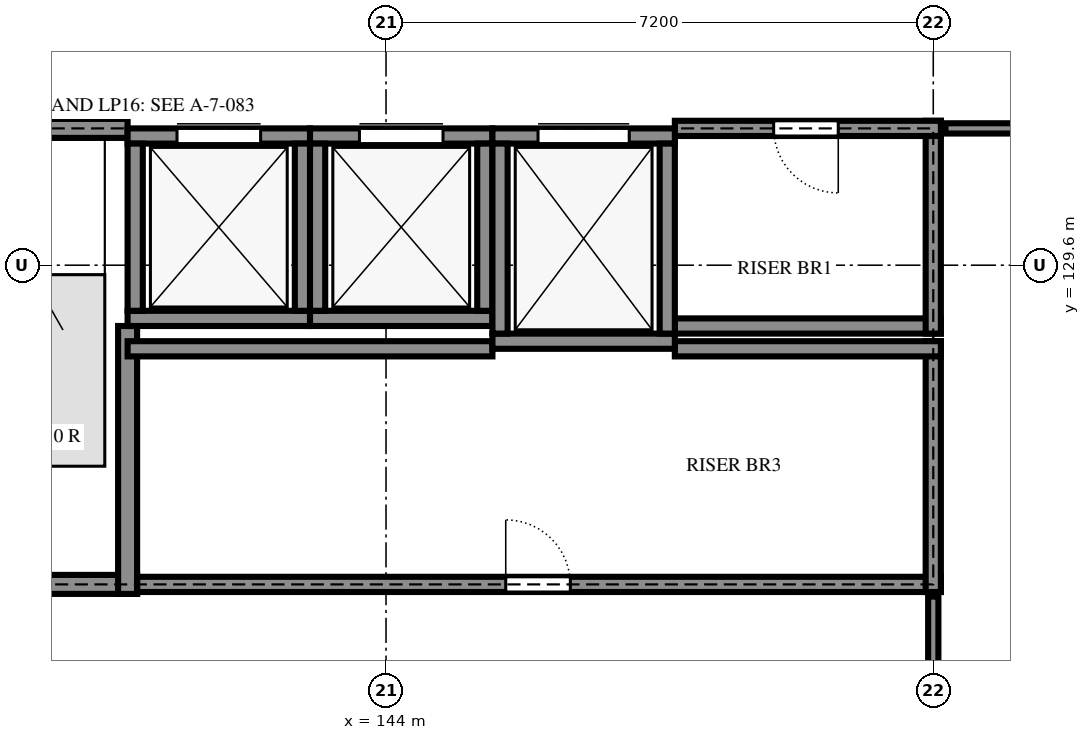
"""IFC4 building model, lengths in metres.
Left out: names, types, materials, properties, quantities, classifications, styles, units other than length and angle.
Written with IfcOpenShell. Run it as: python <this file> out.ifc"""

import sys

from ifc_helpers import new_model, si_unit, direction, frame, frame_2d, origin, place, context, subcontext, project, spatial, rectangle, extrude, element, fill, save


model = new_model("IFC4")
c1 = context("Model", 3, precision=1e-05, world=origin(), true_north=direction((0.0, 1.0)))
c2 = subcontext(c1, "Body", "Model", "MODEL_VIEW")
j1 = project(units=[si_unit("LENGTHUNIT", "METRE"), si_unit("PLANEANGLEUNIT", "RADIAN")], contexts=[c1])
p1 = place(None, origin())
s1 = spatial("IfcSite", under=j1, at=p1, CompositionType="ELEMENT")
p2 = place(p1, origin())
s2 = spatial("IfcBuilding", under=s1, at=p2, CompositionType="ELEMENT")
p3 = place(p2, origin())
s3 = spatial("IfcBuildingStorey", under=s2, at=p3, CompositionType="ELEMENT", Elevation=0.0)
p4 = place(p3, frame((136.675, 125.4, 0.0), z_axis=(0.0, 0.0, 1.0), x_axis=(1.0, 0.0, 0.0)))
e1 = element("IfcWall", 1, at=p4, inside=s3, PredefinedType="SHEAR", context=c2, shape_type="SweptSolid", body=[
    extrude(rectangle(XDim=4.05, YDim=0.25, at=frame_2d((2.025, 0.0))), origin(), (0.0, 0.0, 1.0), 3.6),
])
p5 = place(p4, frame((1.375, 0.0, 0.0)))
e2 = element("IfcOpeningElement", 2, at=p5, cuts=e1, PredefinedType="OPENING", context=c2, shape_type="SweptSolid", body=[
    extrude(rectangle(XDim=1.2, YDim=2.4, at=frame_2d((0.6, 1.2))), frame((0.0, 0.135, 0.0), z_axis=(0.0, -1.0, 0.0), x_axis=(1.0, 0.0, 0.0)), (0.0, 0.0, 1.0), 0.27),
])
p6 = place(p3, frame((140.725, 125.4, 0.0), z_axis=(0.0, 0.0, 1.0), x_axis=(1.0, 0.0, 0.0)))
e3 = element("IfcWall", 3, at=p6, inside=s3, PredefinedType="SHEAR", context=c2, shape_type="SweptSolid", body=[
    extrude(rectangle(XDim=10.575, YDim=0.2, at=frame_2d((5.288, 0.0))), origin(), (0.0, 0.0, 1.0), 3.6),
])
p7 = place(p6, frame((4.85, 0.0, 0.0)))
e4 = element("IfcOpeningElement", 4, at=p7, cuts=e3, PredefinedType="OPENING", context=c2, shape_type="SweptSolid", body=[
    extrude(rectangle(XDim=0.85, YDim=2.1, at=frame_2d((0.425, 1.05))), frame((0.0, 0.11, 0.0), z_axis=(0.0, -1.0, 0.0), x_axis=(1.0, 0.0, 0.0)), (0.0, 0.0, 1.0), 0.22),
])
p8 = place(p3, frame((140.6, 125.275, 0.0), z_axis=(0.0, 0.0, 1.0), x_axis=(0.0, 1.0, 0.0)))
e5 = element("IfcWall", 5, at=p8, inside=s3, PredefinedType="SHEAR", context=c2, shape_type="SweptSolid", body=[
    extrude(rectangle(XDim=3.525, YDim=0.25, at=frame_2d((1.763, 0.0))), origin(), (0.0, 0.0, 1.0), 3.6),
])
p9 = place(p3, frame((151.2, 125.3, 0.0), z_axis=(0.0, 0.0, 1.0), x_axis=(0.0, 1.0, 0.0)))
e6 = element("IfcWall", 6, at=p9, inside=s3, PredefinedType="SHEAR", context=c2, shape_type="SweptSolid", body=[
    extrude(rectangle(XDim=3.3, YDim=0.2, at=frame_2d((1.65, 0.0))), origin(), (0.0, 0.0, 1.0), 3.6),
])
p10 = place(p3, frame((140.6, 128.5, 0.0), z_axis=(0.0, 0.0, 1.0), x_axis=(1.0, 0.0, 0.0)))
e7 = element("IfcWall", 7, at=p10, inside=s3, PredefinedType="SHEAR", context=c2, shape_type="SweptSolid", body=[
    extrude(rectangle(XDim=4.8, YDim=0.2, at=frame_2d((2.4, 0.0))), origin(), (0.0, 0.0, 1.0), 3.6),
])
for number, where, z_axis, x_axis in (
    (8, (147.8, 128.5, 0.0), (0.0, 0.0, 1.0), (1.0, 0.0, 0.0)),
    (9, (147.8, 128.8, 0.0), (0.0, 0.0, 1.0), (1.0, 0.0, 0.0)),
):
    element("IfcWall", number, at=place(p3, frame(where, z_axis=z_axis, x_axis=x_axis)), inside=s3, PredefinedType="SHEAR", context=c2, shape_type="SweptSolid", body=[
        extrude(rectangle(XDim=3.5, YDim=0.2, at=frame_2d((1.75, 0.0))), origin(), (0.0, 0.0, 1.0), 3.6),
    ])
p11 = place(p3, frame((151.2, 128.7, 0.0), z_axis=(0.0, 0.0, 1.0), x_axis=(0.0, 1.0, 0.0)))
e10 = element("IfcWall", 10, at=p11, inside=s3, PredefinedType="SHEAR", context=c2, shape_type="SweptSolid", body=[
    extrude(rectangle(XDim=2.8, YDim=0.2, at=frame_2d((1.4, 0.0))), origin(), (0.0, 0.0, 1.0), 3.6),
])
p12 = place(p3, frame((140.6, 131.4, 0.0), z_axis=(0.0, 0.0, 1.0), x_axis=(-1.0, 0.0, 0.0)))
e11 = element("IfcWall", 11, at=p12, inside=s3, PredefinedType="SHEAR", context=c2, shape_type="SweptSolid", body=[
    extrude(rectangle(XDim=3.925, YDim=0.25, at=frame_2d((1.962, 0.0))), origin(), (0.0, 0.0, 1.0), 3.6),
])
p13 = place(p3, frame((151.3, 131.4, 0.0), z_axis=(0.0, 0.0, 1.0), x_axis=(-1.0, 0.0, 0.0)))
e12 = element("IfcWall", 12, at=p13, inside=s3, PredefinedType="SHEAR", context=c2, shape_type="SweptSolid", body=[
    extrude(rectangle(XDim=3.5, YDim=0.2, at=frame_2d((1.75, 0.0))), origin(), (0.0, 0.0, 1.0), 3.6),
])
p14 = place(p13, frame((1.35, 0.0, 0.0)))
e13 = element("IfcOpeningElement", 13, at=p14, cuts=e12, PredefinedType="OPENING", context=c2, shape_type="SweptSolid", body=[
    extrude(rectangle(XDim=0.85, YDim=2.1, at=frame_2d((0.425, 1.05))), frame((0.0, 0.11, 0.0), z_axis=(0.0, -1.0, 0.0), x_axis=(1.0, 0.0, 0.0)), (0.0, 0.0, 1.0), 0.22),
])
p15 = place(p3, frame((140.6, 128.9, -1.4), z_axis=(0.0, 0.0, 1.0), x_axis=(1.0, 0.0, 0.0)))
e14 = element("IfcWall", 14, at=p15, inside=s3, PredefinedType="SHEAR", context=c2, shape_type="SweptSolid", body=[
    extrude(rectangle(XDim=2.4, YDim=0.2, at=frame_2d((1.2, 0.0))), origin(), (0.0, 0.0, 1.0), 5.0),
])
p16 = place(p3, frame((140.6, 131.3, -1.4), z_axis=(0.0, 0.0, 1.0), x_axis=(1.0, 0.0, 0.0)))
e15 = element("IfcWall", 15, at=p16, inside=s3, PredefinedType="SHEAR", context=c2, shape_type="SweptSolid", body=[
    extrude(rectangle(XDim=2.4, YDim=0.2, at=frame_2d((1.2, 0.0))), origin(), (0.0, 0.0, 1.0), 5.0),
])
p17 = place(p16, frame((0.65, 0.0, 1.4)))
e16 = element("IfcOpeningElement", 16, at=p17, cuts=e15, PredefinedType="OPENING", context=c2, shape_type="SweptSolid", body=[
    extrude(rectangle(XDim=1.1, YDim=2.1, at=frame_2d((0.55, 1.05))), frame((0.0, 0.11, 0.0), z_axis=(0.0, -1.0, 0.0), x_axis=(1.0, 0.0, 0.0)), (0.0, 0.0, 1.0), 0.22),
])
for number, where, z_axis, x_axis in (
    (17, (140.7, 129.0, -1.4), (0.0, 0.0, 1.0), (0.0, 1.0, 0.0)),
    (18, (142.9, 129.0, -1.4), (0.0, 0.0, 1.0), (0.0, 1.0, 0.0)),
):
    element("IfcWall", number, at=place(p3, frame(where, z_axis=z_axis, x_axis=x_axis)), inside=s3, PredefinedType="SHEAR", context=c2, shape_type="SweptSolid", body=[
        extrude(rectangle(XDim=2.2, YDim=0.2, at=frame_2d((1.1, 0.0))), origin(), (0.0, 0.0, 1.0), 5.0),
    ])
p18 = place(p3, frame((143.0, 128.9, -1.4), z_axis=(0.0, 0.0, 1.0), x_axis=(1.0, 0.0, 0.0)))
e19 = element("IfcWall", 19, at=p18, inside=s3, PredefinedType="SHEAR", context=c2, shape_type="SweptSolid", body=[
    extrude(rectangle(XDim=2.4, YDim=0.2, at=frame_2d((1.2, 0.0))), origin(), (0.0, 0.0, 1.0), 5.0),
])
p19 = place(p3, frame((143.0, 131.3, -1.4), z_axis=(0.0, 0.0, 1.0), x_axis=(1.0, 0.0, 0.0)))
e20 = element("IfcWall", 20, at=p19, inside=s3, PredefinedType="SHEAR", context=c2, shape_type="SweptSolid", body=[
    extrude(rectangle(XDim=2.4, YDim=0.2, at=frame_2d((1.2, 0.0))), origin(), (0.0, 0.0, 1.0), 5.0),
])
p20 = place(p19, frame((0.65, 0.0, 1.4)))
e21 = element("IfcOpeningElement", 21, at=p20, cuts=e20, PredefinedType="OPENING", context=c2, shape_type="SweptSolid", body=[
    extrude(rectangle(XDim=1.1, YDim=2.1, at=frame_2d((0.55, 1.05))), frame((0.0, 0.11, 0.0), z_axis=(0.0, -1.0, 0.0), x_axis=(1.0, 0.0, 0.0)), (0.0, 0.0, 1.0), 0.22),
])
for number, where, z_axis, x_axis in (
    (22, (143.1, 129.0, -1.4), (0.0, 0.0, 1.0), (0.0, 1.0, 0.0)),
    (23, (145.3, 129.0, -1.4), (0.0, 0.0, 1.0), (0.0, 1.0, 0.0)),
):
    element("IfcWall", number, at=place(p3, frame(where, z_axis=z_axis, x_axis=x_axis)), inside=s3, PredefinedType="SHEAR", context=c2, shape_type="SweptSolid", body=[
        extrude(rectangle(XDim=2.2, YDim=0.2, at=frame_2d((1.1, 0.0))), origin(), (0.0, 0.0, 1.0), 5.0),
    ])
p21 = place(p3, frame((145.4, 128.6, -1.4), z_axis=(0.0, 0.0, 1.0), x_axis=(1.0, 0.0, 0.0)))
e24 = element("IfcWall", 24, at=p21, inside=s3, PredefinedType="SHEAR", context=c2, shape_type="SweptSolid", body=[
    extrude(rectangle(XDim=2.4, YDim=0.2, at=frame_2d((1.2, 0.0))), origin(), (0.0, 0.0, 1.0), 5.0),
])
p22 = place(p3, frame((145.4, 131.3, -1.4), z_axis=(0.0, 0.0, 1.0), x_axis=(1.0, 0.0, 0.0)))
e25 = element("IfcWall", 25, at=p22, inside=s3, PredefinedType="SHEAR", context=c2, shape_type="SweptSolid", body=[
    extrude(rectangle(XDim=2.4, YDim=0.2, at=frame_2d((1.2, 0.0))), origin(), (0.0, 0.0, 1.0), 5.0),
])
p23 = place(p22, frame((0.6, 0.0, 1.4)))
e26 = element("IfcOpeningElement", 26, at=p23, cuts=e25, PredefinedType="OPENING", context=c2, shape_type="SweptSolid", body=[
    extrude(rectangle(XDim=1.2, YDim=2.1, at=frame_2d((0.6, 1.05))), frame((0.0, 0.11, 0.0), z_axis=(0.0, -1.0, 0.0), x_axis=(1.0, 0.0, 0.0)), (0.0, 0.0, 1.0), 0.22),
])
for number, where, z_axis, x_axis in (
    (27, (145.5, 128.7, -1.4), (0.0, 0.0, 1.0), (0.0, 1.0, 0.0)),
    (28, (147.7, 128.7, -1.4), (0.0, 0.0, 1.0), (0.0, 1.0, 0.0)),
):
    element("IfcWall", number, at=place(p3, frame(where, z_axis=z_axis, x_axis=x_axis)), inside=s3, PredefinedType="SHEAR", context=c2, shape_type="SweptSolid", body=[
        extrude(rectangle(XDim=2.5, YDim=0.2, at=frame_2d((1.25, 0.0))), origin(), (0.0, 0.0, 1.0), 5.0),
    ])
p24 = place(p3, frame((151.2, 122.55, 0.0), z_axis=(0.0, 0.0, 1.0), x_axis=(0.0, 1.0, 0.0)))
e29 = element("IfcWall", 29, at=p24, inside=s3, PredefinedType="PARTITIONING", context=c2, shape_type="SweptSolid", body=[
    extrude(rectangle(XDim=2.69, YDim=0.135, at=frame_2d((1.345, 0.0))), origin(), (0.0, 0.0, 1.0), 3.219),
])
p25 = place(p3, frame((172.615, 131.4, 0.0), z_axis=(0.0, 0.0, 1.0), x_axis=(-1.0, 0.0, 0.0)))
e30 = element("IfcWall", 30, at=p25, inside=s3, PredefinedType="PARTITIONING", context=c2, shape_type="SweptSolid", body=[
    extrude(rectangle(XDim=21.255, YDim=0.135, at=frame_2d((10.627, 0.0))), origin(), (0.0, 0.0, 1.0), 3.4),
])
p26 = place(p25, frame((10.15, 0.0, 0.0)))
e31 = element("IfcOpeningElement", 31, at=p26, cuts=e30, PredefinedType="OPENING", context=c2, shape_type="SweptSolid", body=[
    extrude(rectangle(XDim=1.0, YDim=2.4, at=frame_2d((0.5, 1.2))), frame((0.0, 0.077, 0.0), z_axis=(0.0, -1.0, 0.0), x_axis=(1.0, 0.0, 0.0)), (0.0, 0.0, 1.0), 0.155),
])
p27 = place(p17, origin())
e32 = element("IfcDoor", 32, at=p27, inside=s3, OperationType="SLIDING_TO_LEFT", PredefinedType="DOOR", context=c2, shape_type="SweptSolid", body=[
    extrude(rectangle(XDim=1.1, YDim=2.1, at=frame_2d((0.55, 1.05))), frame((0.0, 0.025, 0.0), z_axis=(0.0, -1.0, 0.0), x_axis=(1.0, 0.0, 0.0)), (0.0, 0.0, 1.0), 0.05),
])
fill(e16, e32)
p28 = place(p20, origin())
e33 = element("IfcDoor", 33, at=p28, inside=s3, OperationType="SLIDING_TO_LEFT", PredefinedType="DOOR", context=c2, shape_type="SweptSolid", body=[
    extrude(rectangle(XDim=1.1, YDim=2.1, at=frame_2d((0.55, 1.05))), frame((0.0, 0.025, 0.0), z_axis=(0.0, -1.0, 0.0), x_axis=(1.0, 0.0, 0.0)), (0.0, 0.0, 1.0), 0.05),
])
fill(e21, e33)
p29 = place(p23, origin())
e34 = element("IfcDoor", 34, at=p29, inside=s3, OperationType="SLIDING_TO_LEFT", PredefinedType="DOOR", context=c2, shape_type="SweptSolid", body=[
    extrude(rectangle(XDim=1.2, YDim=2.1, at=frame_2d((0.6, 1.05))), frame((0.0, 0.025, 0.0), z_axis=(0.0, -1.0, 0.0), x_axis=(1.0, 0.0, 0.0)), (0.0, 0.0, 1.0), 0.05),
])
fill(e26, e34)
p30 = place(p14, origin())
e35 = element("IfcDoor", 35, at=p30, inside=s3, OperationType="SINGLE_SWING_RIGHT", PredefinedType="DOOR", context=c2, shape_type="SweptSolid", body=[
    extrude(rectangle(XDim=0.85, YDim=2.1, at=frame_2d((0.425, 1.05))), frame((0.0, 0.025, 0.0), z_axis=(0.0, -1.0, 0.0), x_axis=(1.0, 0.0, 0.0)), (0.0, 0.0, 1.0), 0.05),
])
fill(e13, e35)
p31 = place(p7, origin())
e36 = element("IfcDoor", 36, at=p31, inside=s3, OperationType="SINGLE_SWING_RIGHT", PredefinedType="DOOR", context=c2, shape_type="SweptSolid", body=[
    extrude(rectangle(XDim=0.85, YDim=2.1, at=frame_2d((0.425, 1.05))), frame((0.0, 0.025, 0.0), z_axis=(0.0, -1.0, 0.0), x_axis=(1.0, 0.0, 0.0)), (0.0, 0.0, 1.0), 0.05),
])
fill(e4, e36)
save(model, sys.argv[1])
